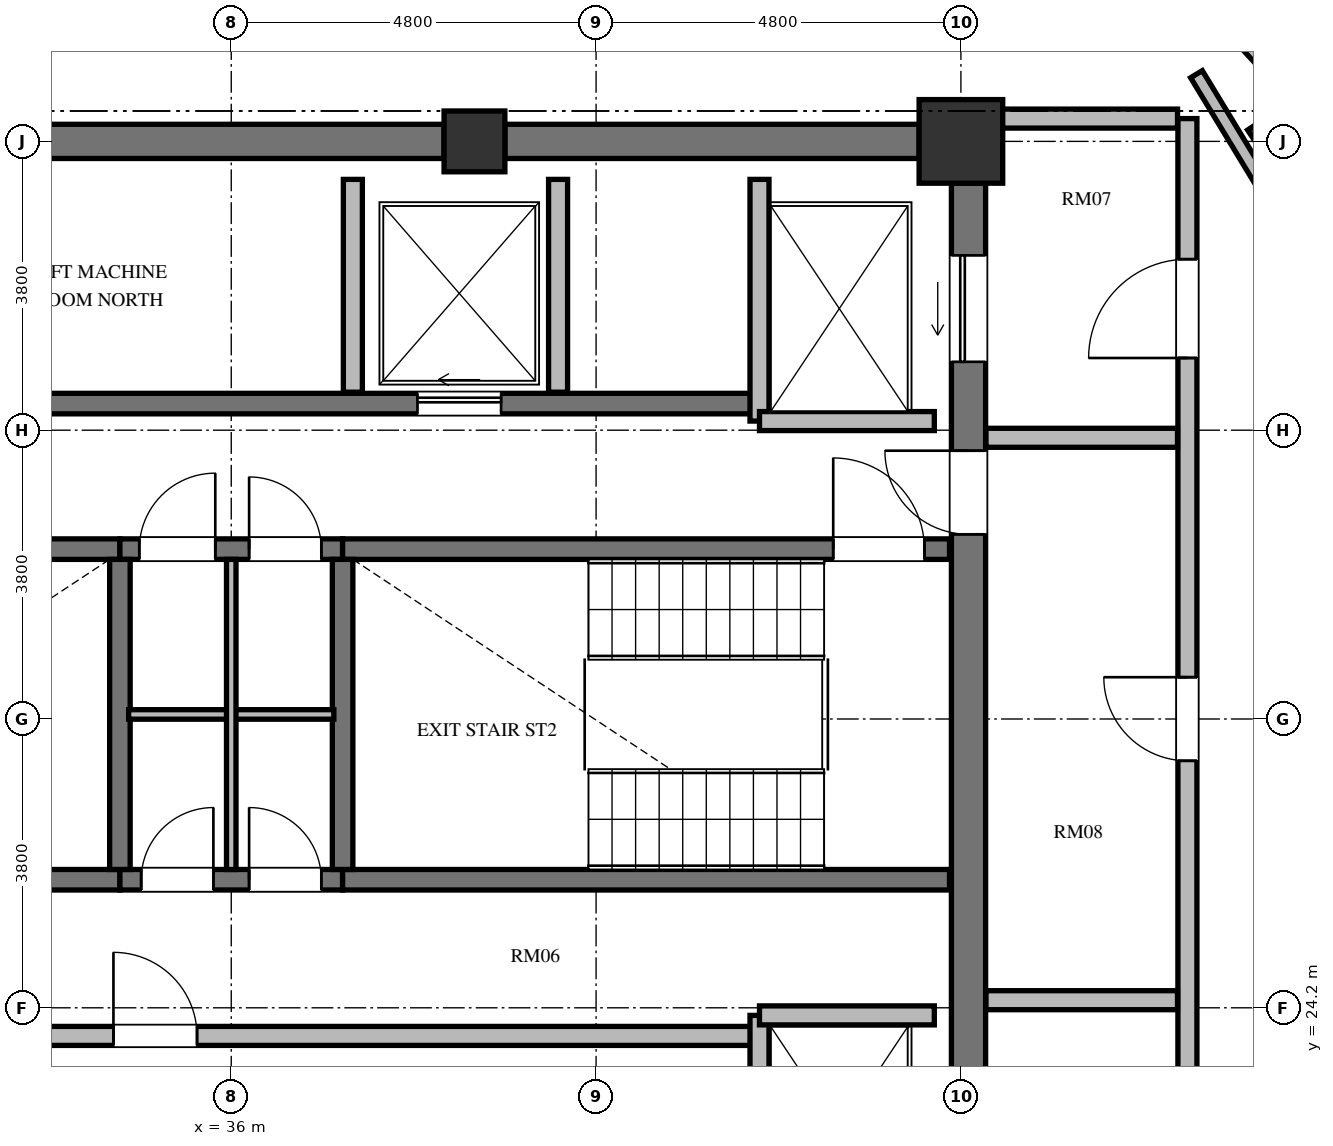
"""IFC4 building model, lengths in metres.
Left out: names, types, materials, properties, quantities, classifications, styles, units other than length and angle.
Written with IfcOpenShell. Run it as: python <this file> out.ifc"""

import sys

from ifc_helpers import new_model, si_unit, direction, frame, frame_2d, origin, origin_2d, place, context, subcontext, project, spatial, rectangle, extrude, element, fill, save


model = new_model("IFC4")
c1 = context("Model", 3, precision=1e-05, world=origin(), true_north=direction((0.0, 1.0)))
c2 = subcontext(c1, "Body", "Model", "MODEL_VIEW")
j1 = project(units=[si_unit("LENGTHUNIT", "METRE"), si_unit("PLANEANGLEUNIT", "RADIAN")], contexts=[c1])
p1 = place(None, origin())
s1 = spatial("IfcSite", under=j1, at=p1, CompositionType="ELEMENT")
p2 = place(p1, origin())
s2 = spatial("IfcBuilding", under=s1, at=p2, CompositionType="ELEMENT")
p3 = place(p2, frame((0.0, 0.0, 305.836)))
s3 = spatial("IfcBuildingStorey", under=s2, at=p3, CompositionType="ELEMENT", Elevation=305.836)
p4 = place(p3, frame((50.052, 35.722, 0.0), z_axis=(0.0, 0.0, 1.0), x_axis=(0.831469612303, 0.55557023302, 0.0)))
e1 = element("IfcColumn", 1, at=p4, inside=s3, PredefinedType="COLUMN", context=c2, shape_type="SweptSolid", body=[
    extrude(rectangle(XDim=1.1, YDim=0.8, at=origin_2d()), origin(), (0.0, 0.0, 1.0), 3.388),
])
p5 = place(p3, frame((45.6, 35.6, 0.0), z_axis=(0.0, 0.0, 1.0), x_axis=(1.0, 0.0, 0.0)))
e2 = element("IfcColumn", 2, at=p5, inside=s3, PredefinedType="COLUMN", context=c2, shape_type="SweptSolid", body=[
    extrude(rectangle(XDim=1.1, YDim=1.1, at=origin_2d()), origin(), (0.0, 0.0, 1.0), 3.388),
])
p6 = place(p3, frame((39.2, 35.6, 0.0), z_axis=(0.0, 0.0, 1.0), x_axis=(1.0, 0.0, 0.0)))
e3 = element("IfcColumn", 3, at=p6, inside=s3, PredefinedType="COLUMN", context=c2, shape_type="SweptSolid", body=[
    extrude(rectangle(XDim=0.8, YDim=0.8, at=origin_2d()), origin(), (0.0, 0.0, 1.0), 3.388),
])
p7 = place(p3, frame((45.7, 20.95, 0.0), z_axis=(0.0, 0.0, 1.0), x_axis=(0.0, 1.0, 0.0)))
e4 = element("IfcWall", 4, at=p7, inside=s3, PredefinedType="SHEAR", context=c2, shape_type="SweptSolid", body=[
    extrude(rectangle(XDim=14.1, YDim=0.45, at=frame_2d((7.05, 0.0))), origin(), (0.0, 0.0, 1.0), 3.388),
])
p8 = place(p7, frame((11.75, 0.0, 0.0)))
e5 = element("IfcOpeningElement", 5, at=p8, cuts=e4, PredefinedType="OPENING", context=c2, shape_type="SweptSolid", body=[
    extrude(rectangle(XDim=1.4, YDim=2.3, at=frame_2d((0.7, 1.15))), frame((0.0, 0.235, 0.0), z_axis=(0.0, -1.0, 0.0), x_axis=(1.0, 0.0, 0.0)), (0.0, 0.0, 1.0), 0.47),
])
p9 = place(p7, frame((0.95, 0.0, 0.0)))
e6 = element("IfcOpeningElement", 6, at=p9, cuts=e4, PredefinedType="OPENING", context=c2, shape_type="SweptSolid", body=[
    extrude(rectangle(XDim=1.4, YDim=2.3, at=frame_2d((0.7, 1.15))), frame((0.0, 0.235, 0.0), z_axis=(0.0, -1.0, 0.0), x_axis=(1.0, 0.0, 0.0)), (0.0, 0.0, 1.0), 0.47),
])
p10 = place(p7, frame((9.48, 0.0, 0.0)))
e7 = element("IfcOpeningElement", 7, at=p10, cuts=e4, PredefinedType="OPENING", context=c2, shape_type="SweptSolid", body=[
    extrude(rectangle(XDim=1.1, YDim=2.15, at=frame_2d((0.55, 1.075))), frame((0.0, 0.235, 0.0), z_axis=(0.0, -1.0, 0.0), x_axis=(1.0, 0.0, 0.0)), (0.0, 0.0, 1.0), 0.47),
])
p11 = place(p3, frame((33.2, 35.6, 0.0), z_axis=(0.0, 0.0, 1.0), x_axis=(1.0, 0.0, 0.0)))
e8 = element("IfcWall", 8, at=p11, inside=s3, PredefinedType="SHEAR", context=c2, shape_type="SweptSolid", body=[
    extrude(rectangle(XDim=5.6, YDim=0.45, at=frame_2d((2.8, 0.0))), origin(), (0.0, 0.0, 1.0), 3.388),
])
p12 = place(p3, frame((39.6, 35.6, 0.0), z_axis=(0.0, 0.0, 1.0), x_axis=(1.0, 0.0, 0.0)))
e9 = element("IfcWall", 9, at=p12, inside=s3, PredefinedType="SHEAR", context=c2, shape_type="SweptSolid", body=[
    extrude(rectangle(XDim=5.45, YDim=0.45, at=frame_2d((2.725, 0.0))), origin(), (0.0, 0.0, 1.0), 3.388),
])
p13 = place(p3, frame((51.098, 35.082, 0.0), z_axis=(0.0, 0.0, 1.0), x_axis=(-0.680156447476, 0.733066986678, 0.0)))
e10 = element("IfcWall", 10, at=p13, inside=s3, PredefinedType="SOLIDWALL", context=c2, shape_type="SweptSolid", body=[
    extrude(rectangle(XDim=4.291, YDim=0.28, at=frame_2d((2.146, 0.0))), origin(), (0.0, 0.0, 1.0), 3.068),
])
p14 = place(p3, frame((26.55, 30.235, 0.0), z_axis=(0.0, 0.0, 1.0), x_axis=(1.0, 0.0, 0.0)))
e11 = element("IfcWall", 11, at=p14, inside=s3, PredefinedType="SHEAR", context=c2, shape_type="SweptSolid", body=[
    extrude(rectangle(XDim=7.985, YDim=0.27, at=frame_2d((3.992, 0.0))), origin(), (0.0, 0.0, 1.0), 3.388),
])
p15 = place(p3, frame((34.535, 30.235, 0.0), z_axis=(0.0, 0.0, 1.0), x_axis=(1.0, 0.0, 0.0)))
e12 = element("IfcWall", 12, at=p15, inside=s3, PredefinedType="SHEAR", context=c2, shape_type="SweptSolid", body=[
    extrude(rectangle(XDim=2.93, YDim=0.27, at=frame_2d((1.465, 0.0))), origin(), (0.0, 0.0, 1.0), 3.388),
])
p16 = place(p15, frame((0.255, 0.0, 0.0)))
e13 = element("IfcOpeningElement", 13, at=p16, cuts=e12, PredefinedType="OPENING", context=c2, shape_type="SweptSolid", body=[
    extrude(rectangle(XDim=1.0, YDim=2.1, at=frame_2d((0.5, 1.05))), frame((0.0, 0.145, 0.0), z_axis=(0.0, -1.0, 0.0), x_axis=(1.0, 0.0, 0.0)), (0.0, 0.0, 1.0), 0.29),
])
p17 = place(p15, frame((1.7, 0.0, 0.0)))
e14 = element("IfcOpeningElement", 14, at=p17, cuts=e12, PredefinedType="OPENING", context=c2, shape_type="SweptSolid", body=[
    extrude(rectangle(XDim=0.95, YDim=2.1, at=frame_2d((0.475, 1.05))), frame((0.0, 0.145, 0.0), z_axis=(0.0, -1.0, 0.0), x_axis=(1.0, 0.0, 0.0)), (0.0, 0.0, 1.0), 0.29),
])
p18 = place(p3, frame((37.465, 30.235, 0.0), z_axis=(0.0, 0.0, 1.0), x_axis=(1.0, 0.0, 0.0)))
e15 = element("IfcWall", 15, at=p18, inside=s3, PredefinedType="SHEAR", context=c2, shape_type="SweptSolid", body=[
    extrude(rectangle(XDim=7.985, YDim=0.27, at=frame_2d((3.992, 0.0))), origin(), (0.0, 0.0, 1.0), 3.388),
])
p19 = place(p18, frame((6.455, 0.0, 0.0)))
e16 = element("IfcOpeningElement", 16, at=p19, cuts=e15, PredefinedType="OPENING", context=c2, shape_type="SweptSolid", body=[
    extrude(rectangle(XDim=1.2, YDim=2.15, at=frame_2d((0.6, 1.075))), frame((0.0, 0.145, 0.0), z_axis=(0.0, -1.0, 0.0), x_axis=(1.0, 0.0, 0.0)), (0.0, 0.0, 1.0), 0.29),
])
p20 = place(p3, frame((26.55, 25.885, 0.0), z_axis=(0.0, 0.0, 1.0), x_axis=(1.0, 0.0, 0.0)))
e17 = element("IfcWall", 17, at=p20, inside=s3, PredefinedType="SHEAR", context=c2, shape_type="SweptSolid", body=[
    extrude(rectangle(XDim=7.985, YDim=0.27, at=frame_2d((3.992, 0.0))), origin(), (0.0, 0.0, 1.0), 3.388),
])
p21 = place(p3, frame((34.535, 25.885, 0.0), z_axis=(0.0, 0.0, 1.0), x_axis=(1.0, 0.0, 0.0)))
e18 = element("IfcWall", 18, at=p21, inside=s3, PredefinedType="SHEAR", context=c2, shape_type="SweptSolid", body=[
    extrude(rectangle(XDim=2.93, YDim=0.27, at=frame_2d((1.465, 0.0))), origin(), (0.0, 0.0, 1.0), 3.388),
])
p22 = place(p21, frame((0.28, 0.0, 0.0)))
e19 = element("IfcOpeningElement", 19, at=p22, cuts=e18, PredefinedType="OPENING", context=c2, shape_type="SweptSolid", body=[
    extrude(rectangle(XDim=0.95, YDim=2.1, at=frame_2d((0.475, 1.05))), frame((0.0, 0.145, 0.0), z_axis=(0.0, -1.0, 0.0), x_axis=(1.0, 0.0, 0.0)), (0.0, 0.0, 1.0), 0.29),
])
p23 = place(p21, frame((1.7, 0.0, 0.0)))
e20 = element("IfcOpeningElement", 20, at=p23, cuts=e18, PredefinedType="OPENING", context=c2, shape_type="SweptSolid", body=[
    extrude(rectangle(XDim=0.95, YDim=2.1, at=frame_2d((0.475, 1.05))), frame((0.0, 0.145, 0.0), z_axis=(0.0, -1.0, 0.0), x_axis=(1.0, 0.0, 0.0)), (0.0, 0.0, 1.0), 0.29),
])
p24 = place(p3, frame((37.465, 25.885, 0.0), z_axis=(0.0, 0.0, 1.0), x_axis=(1.0, 0.0, 0.0)))
e21 = element("IfcWall", 21, at=p24, inside=s3, PredefinedType="SHEAR", context=c2, shape_type="SweptSolid", body=[
    extrude(rectangle(XDim=7.985, YDim=0.27, at=frame_2d((3.992, 0.0))), origin(), (0.0, 0.0, 1.0), 3.388),
])
for number, where, z_axis, x_axis in (
    (22, (34.535, 26.02, 0.0), (0.0, 0.0, 1.0), (0.0, 1.0, 0.0)),
    (23, (37.465, 26.02, 0.0), (0.0, 0.0, 1.0), (0.0, 1.0, 0.0)),
):
    element("IfcWall", number, at=place(p3, frame(where, z_axis=z_axis, x_axis=x_axis)), inside=s3, PredefinedType="SHEAR", context=c2, shape_type="SweptSolid", body=[
        extrude(rectangle(XDim=4.08, YDim=0.27, at=frame_2d((2.04, 0.0))), origin(), (0.0, 0.0, 1.0), 3.388),
    ])
p25 = place(p3, frame((34.65, 28.06, 0.0), z_axis=(0.0, 0.0, 1.0), x_axis=(1.0, 0.0, 0.0)))
e24 = element("IfcWall", 24, at=p25, inside=s3, PredefinedType="PARTITIONING", context=c2, shape_type="SweptSolid", body=[
    extrude(rectangle(XDim=2.7, YDim=0.125, at=frame_2d((1.35, 0.0))), origin(), (0.0, 0.0, 1.0), 3.068),
])
p26 = place(p3, frame((36.0, 26.02, 0.0), z_axis=(0.0, 0.0, 1.0), x_axis=(0.0, 1.0, 0.0)))
e25 = element("IfcWall", 25, at=p26, inside=s3, PredefinedType="PARTITIONING", context=c2, shape_type="SweptSolid", body=[
    extrude(rectangle(XDim=4.08, YDim=0.125, at=frame_2d((2.04, 0.0))), origin(), (0.0, 0.0, 1.0), 3.068),
])
p27 = place(p3, frame((26.55, 32.15, 0.0), z_axis=(0.0, 0.0, 1.0), x_axis=(1.0, 0.0, 0.0)))
e26 = element("IfcWall", 26, at=p27, inside=s3, PredefinedType="SHEAR", context=c2, shape_type="SweptSolid", body=[
    extrude(rectangle(XDim=16.4, YDim=0.27, at=frame_2d((8.2, 0.0))), origin(), (0.0, 0.0, 1.0), 3.388),
])
p28 = place(p27, frame((4.9, 0.0, 0.0)))
e27 = element("IfcOpeningElement", 27, at=p28, cuts=e26, PredefinedType="OPENING", context=c2, shape_type="SweptSolid", body=[
    extrude(rectangle(XDim=1.1, YDim=2.15, at=frame_2d((0.55, 1.075))), frame((0.0, 0.145, 0.0), z_axis=(0.0, -1.0, 0.0), x_axis=(1.0, 0.0, 0.0)), (0.0, 0.0, 1.0), 0.29),
])
p29 = place(p27, frame((11.9, 0.0, 0.0)))
e28 = element("IfcOpeningElement", 28, at=p29, cuts=e26, PredefinedType="OPENING", context=c2, shape_type="SweptSolid", body=[
    extrude(rectangle(XDim=1.1, YDim=2.2, at=frame_2d((0.55, 1.1))), frame((0.0, 0.145, 0.0), z_axis=(0.0, -1.0, 0.0), x_axis=(1.0, 0.0, 0.0)), (0.0, 0.0, 1.0), 0.29),
])
p30 = place(p3, frame((26.75, 23.83, 0.0), z_axis=(0.0, 0.0, 1.0), x_axis=(1.0, 0.0, 0.0)))
e29 = element("IfcWall", 29, at=p30, inside=s3, PredefinedType="SOLIDWALL", context=c2, shape_type="SweptSolid", body=[
    extrude(rectangle(XDim=16.2, YDim=0.25, at=frame_2d((8.1, 0.0))), origin(), (0.0, 0.0, 1.0), 3.068),
])
p31 = place(p30, frame((7.7, 0.0, 0.0)))
e30 = element("IfcOpeningElement", 30, at=p31, cuts=e29, PredefinedType="OPENING", context=c2, shape_type="SweptSolid", body=[
    extrude(rectangle(XDim=1.1, YDim=2.15, at=frame_2d((0.55, 1.075))), frame((0.0, 0.135, 0.0), z_axis=(0.0, -1.0, 0.0), x_axis=(1.0, 0.0, 0.0)), (0.0, 0.0, 1.0), 0.27),
])
p32 = place(p3, frame((42.95, 31.92, 0.0), z_axis=(0.0, 0.0, 1.0), x_axis=(0.0, 1.0, 0.0)))
e31 = element("IfcWall", 31, at=p32, inside=s3, PredefinedType="SOLIDWALL", context=c2, shape_type="SweptSolid", body=[
    extrude(rectangle(XDim=3.18, YDim=0.25, at=frame_2d((1.59, 0.0))), origin(), (0.0, 0.0, 1.0), 3.068),
])
p33 = place(p3, frame((42.95, 31.92, 0.0), z_axis=(0.0, 0.0, 1.0), x_axis=(1.0, 0.0, 0.0)))
e32 = element("IfcWall", 32, at=p33, inside=s3, PredefinedType="SOLIDWALL", context=c2, shape_type="SweptSolid", body=[
    extrude(rectangle(XDim=2.3, YDim=0.25, at=frame_2d((1.15, 0.0))), origin(), (0.0, 0.0, 1.0), 3.068),
])
p34 = place(p3, frame((42.95, 20.9, 0.0), z_axis=(0.0, 0.0, 1.0), x_axis=(0.0, 1.0, 0.0)))
e33 = element("IfcWall", 33, at=p34, inside=s3, PredefinedType="SOLIDWALL", context=c2, shape_type="SweptSolid", body=[
    extrude(rectangle(XDim=3.2, YDim=0.25, at=frame_2d((1.6, 0.0))), origin(), (0.0, 0.0, 1.0), 3.068),
])
p35 = place(p3, frame((42.95, 24.1, 0.0), z_axis=(0.0, 0.0, 1.0), x_axis=(1.0, 0.0, 0.0)))
e34 = element("IfcWall", 34, at=p35, inside=s3, PredefinedType="SOLIDWALL", context=c2, shape_type="SweptSolid", body=[
    extrude(rectangle(XDim=2.3, YDim=0.25, at=frame_2d((1.15, 0.0))), origin(), (0.0, 0.0, 1.0), 3.068),
])
for number, where, z_axis, x_axis in (
    (35, (37.6, 32.3, 0.0), (0.0, 0.0, 1.0), (0.0, 1.0, 0.0)),
    (36, (40.3, 32.3, 0.0), (0.0, 0.0, 1.0), (0.0, 1.0, 0.0)),
):
    element("IfcWall", number, at=place(p3, frame(where, z_axis=z_axis, x_axis=x_axis)), inside=s3, PredefinedType="SOLIDWALL", context=c2, shape_type="SweptSolid", body=[
        extrude(rectangle(XDim=2.8, YDim=0.25, at=frame_2d((1.4, 0.0))), origin(), (0.0, 0.0, 1.0), 3.068),
    ])
p36 = place(p3, frame((48.58, 20.1, 0.0), z_axis=(0.0, 0.0, 1.0), x_axis=(0.0, 1.0, 0.0)))
e37 = element("IfcWall", 37, at=p36, inside=s3, PredefinedType="SOLIDWALL", context=c2, shape_type="SweptSolid", body=[
    extrude(rectangle(XDim=15.8, YDim=0.25, at=frame_2d((7.9, 0.0))), origin(), (0.0, 0.0, 1.0), 3.068),
])
p37 = place(p36, frame((12.65, 0.0, 0.0)))
e38 = element("IfcOpeningElement", 38, at=p37, cuts=e37, PredefinedType="OPENING", context=c2, shape_type="SweptSolid", body=[
    extrude(rectangle(XDim=1.3, YDim=2.2, at=frame_2d((0.65, 1.1))), frame((0.0, 0.135, 0.0), z_axis=(0.0, -1.0, 0.0), x_axis=(1.0, 0.0, 0.0)), (0.0, 0.0, 1.0), 0.27),
])
p38 = place(p36, frame((7.35, 0.0, 0.0)))
e39 = element("IfcOpeningElement", 39, at=p38, cuts=e37, PredefinedType="OPENING", context=c2, shape_type="SweptSolid", body=[
    extrude(rectangle(XDim=1.1, YDim=2.15, at=frame_2d((0.55, 1.075))), frame((0.0, 0.135, 0.0), z_axis=(0.0, -1.0, 0.0), x_axis=(1.0, 0.0, 0.0)), (0.0, 0.0, 1.0), 0.27),
])
p39 = place(p36, frame((1.85, 0.0, 0.0)))
e40 = element("IfcOpeningElement", 40, at=p39, cuts=e37, PredefinedType="OPENING", context=c2, shape_type="SweptSolid", body=[
    extrude(rectangle(XDim=1.3, YDim=2.2, at=frame_2d((0.65, 1.1))), frame((0.0, 0.135, 0.0), z_axis=(0.0, -1.0, 0.0), x_axis=(1.0, 0.0, 0.0)), (0.0, 0.0, 1.0), 0.27),
])
for number, where, z_axis, x_axis in (
    (41, (45.93, 35.9, 0.0), (0.0, 0.0, 1.0), (1.0, 0.0, 0.0)),
    (42, (45.93, 31.7, 0.0), (0.0, 0.0, 1.0), (1.0, 0.0, 0.0)),
    (43, (45.93, 24.3, 0.0), (0.0, 0.0, 1.0), (1.0, 0.0, 0.0)),
):
    element("IfcWall", number, at=place(p3, frame(where, z_axis=z_axis, x_axis=x_axis)), inside=s3, PredefinedType="SOLIDWALL", context=c2, shape_type="SweptSolid", body=[
        extrude(rectangle(XDim=2.52, YDim=0.25, at=frame_2d((1.26, 0.0))), origin(), (0.0, 0.0, 1.0), 3.068),
    ])
p40 = place(p3, frame((48.699, 36.485, 0.0), z_axis=(0.0, 0.0, 1.0), x_axis=(0.518614420457, -0.855008235571, 0.0)))
e44 = element("IfcWall", 44, at=p40, inside=s3, PredefinedType="PARTITIONING", context=c2, shape_type="SweptSolid", body=[
    extrude(rectangle(XDim=4.187, YDim=0.18, at=frame_2d((2.094, 0.0))), origin(), (0.0, 0.0, 1.0), 3.068),
])
p41 = place(p19, origin())
e45 = element("IfcDoor", 45, at=p41, inside=s3, OperationType="SINGLE_SWING_LEFT", PredefinedType="DOOR", context=c2, shape_type="SweptSolid", body=[
    extrude(rectangle(XDim=1.2, YDim=2.15, at=frame_2d((0.6, 1.075))), frame((0.0, 0.025, 0.0), z_axis=(0.0, -1.0, 0.0), x_axis=(1.0, 0.0, 0.0)), (0.0, 0.0, 1.0), 0.05),
])
fill(e16, e45)
p42 = place(p22, origin())
e46 = element("IfcDoor", 46, at=p42, inside=s3, OperationType="SINGLE_SWING_RIGHT", PredefinedType="DOOR", context=c2, shape_type="SweptSolid", body=[
    extrude(rectangle(XDim=0.95, YDim=2.1, at=frame_2d((0.475, 1.05))), frame((0.0, 0.025, 0.0), z_axis=(0.0, -1.0, 0.0), x_axis=(1.0, 0.0, 0.0)), (0.0, 0.0, 1.0), 0.05),
])
fill(e19, e46)
p43 = place(p23, origin())
e47 = element("IfcDoor", 47, at=p43, inside=s3, OperationType="SINGLE_SWING_LEFT", PredefinedType="DOOR", context=c2, shape_type="SweptSolid", body=[
    extrude(rectangle(XDim=0.95, YDim=2.1, at=frame_2d((0.475, 1.05))), frame((0.0, 0.025, 0.0), z_axis=(0.0, -1.0, 0.0), x_axis=(1.0, 0.0, 0.0)), (0.0, 0.0, 1.0), 0.05),
])
fill(e20, e47)
p44 = place(p16, origin())
e48 = element("IfcDoor", 48, at=p44, inside=s3, OperationType="SINGLE_SWING_RIGHT", PredefinedType="DOOR", context=c2, shape_type="SweptSolid", body=[
    extrude(rectangle(XDim=1.0, YDim=2.1, at=frame_2d((0.5, 1.05))), frame((0.0, 0.025, 0.0), z_axis=(0.0, -1.0, 0.0), x_axis=(1.0, 0.0, 0.0)), (0.0, 0.0, 1.0), 0.05),
])
fill(e13, e48)
p45 = place(p17, origin())
e49 = element("IfcDoor", 49, at=p45, inside=s3, OperationType="SINGLE_SWING_LEFT", PredefinedType="DOOR", context=c2, shape_type="SweptSolid", body=[
    extrude(rectangle(XDim=0.95, YDim=2.1, at=frame_2d((0.475, 1.05))), frame((0.0, 0.025, 0.0), z_axis=(0.0, -1.0, 0.0), x_axis=(1.0, 0.0, 0.0)), (0.0, 0.0, 1.0), 0.05),
])
fill(e14, e49)
p46 = place(p31, origin())
e50 = element("IfcDoor", 50, at=p46, inside=s3, OperationType="SINGLE_SWING_LEFT", PredefinedType="DOOR", context=c2, shape_type="SweptSolid", body=[
    extrude(rectangle(XDim=1.1, YDim=2.15, at=frame_2d((0.55, 1.075))), frame((0.0, 0.025, 0.0), z_axis=(0.0, -1.0, 0.0), x_axis=(1.0, 0.0, 0.0)), (0.0, 0.0, 1.0), 0.05),
])
fill(e30, e50)
p47 = place(p29, origin())
e51 = element("IfcDoor", 51, at=p47, inside=s3, OperationType="SLIDING_TO_LEFT", PredefinedType="DOOR", context=c2, shape_type="SweptSolid", body=[
    extrude(rectangle(XDim=1.1, YDim=2.2, at=frame_2d((0.55, 1.1))), frame((0.0, 0.025, 0.0), z_axis=(0.0, -1.0, 0.0), x_axis=(1.0, 0.0, 0.0)), (0.0, 0.0, 1.0), 0.05),
])
fill(e28, e51)
p48 = place(p8, origin())
e52 = element("IfcDoor", 52, at=p48, inside=s3, OperationType="SLIDING_TO_LEFT", PredefinedType="DOOR", context=c2, shape_type="SweptSolid", body=[
    extrude(rectangle(XDim=1.4, YDim=2.3, at=frame_2d((0.7, 1.15))), frame((0.0, 0.025, 0.0), z_axis=(0.0, -1.0, 0.0), x_axis=(1.0, 0.0, 0.0)), (0.0, 0.0, 1.0), 0.05),
])
fill(e5, e52)
p49 = place(p10, origin())
e53 = element("IfcDoor", 53, at=p49, inside=s3, OperationType="SINGLE_SWING_RIGHT", PredefinedType="DOOR", context=c2, shape_type="SweptSolid", body=[
    extrude(rectangle(XDim=1.1, YDim=2.15, at=frame_2d((0.55, 1.075))), frame((0.0, 0.025, 0.0), z_axis=(0.0, -1.0, 0.0), x_axis=(1.0, 0.0, 0.0)), (0.0, 0.0, 1.0), 0.05),
])
fill(e7, e53)
p50 = place(p37, origin())
e54 = element("IfcDoor", 54, at=p50, inside=s3, OperationType="SINGLE_SWING_LEFT", PredefinedType="DOOR", context=c2, shape_type="SweptSolid", body=[
    extrude(rectangle(XDim=1.3, YDim=2.2, at=frame_2d((0.65, 1.1))), frame((0.0, 0.025, 0.0), z_axis=(0.0, -1.0, 0.0), x_axis=(1.0, 0.0, 0.0)), (0.0, 0.0, 1.0), 0.05),
])
fill(e38, e54)
p51 = place(p38, origin())
e55 = element("IfcDoor", 55, at=p51, inside=s3, OperationType="SINGLE_SWING_RIGHT", PredefinedType="DOOR", context=c2, shape_type="SweptSolid", body=[
    extrude(rectangle(XDim=1.1, YDim=2.15, at=frame_2d((0.55, 1.075))), frame((0.0, 0.025, 0.0), z_axis=(0.0, -1.0, 0.0), x_axis=(1.0, 0.0, 0.0)), (0.0, 0.0, 1.0), 0.05),
])
fill(e39, e55)
save(model, sys.argv[1])
